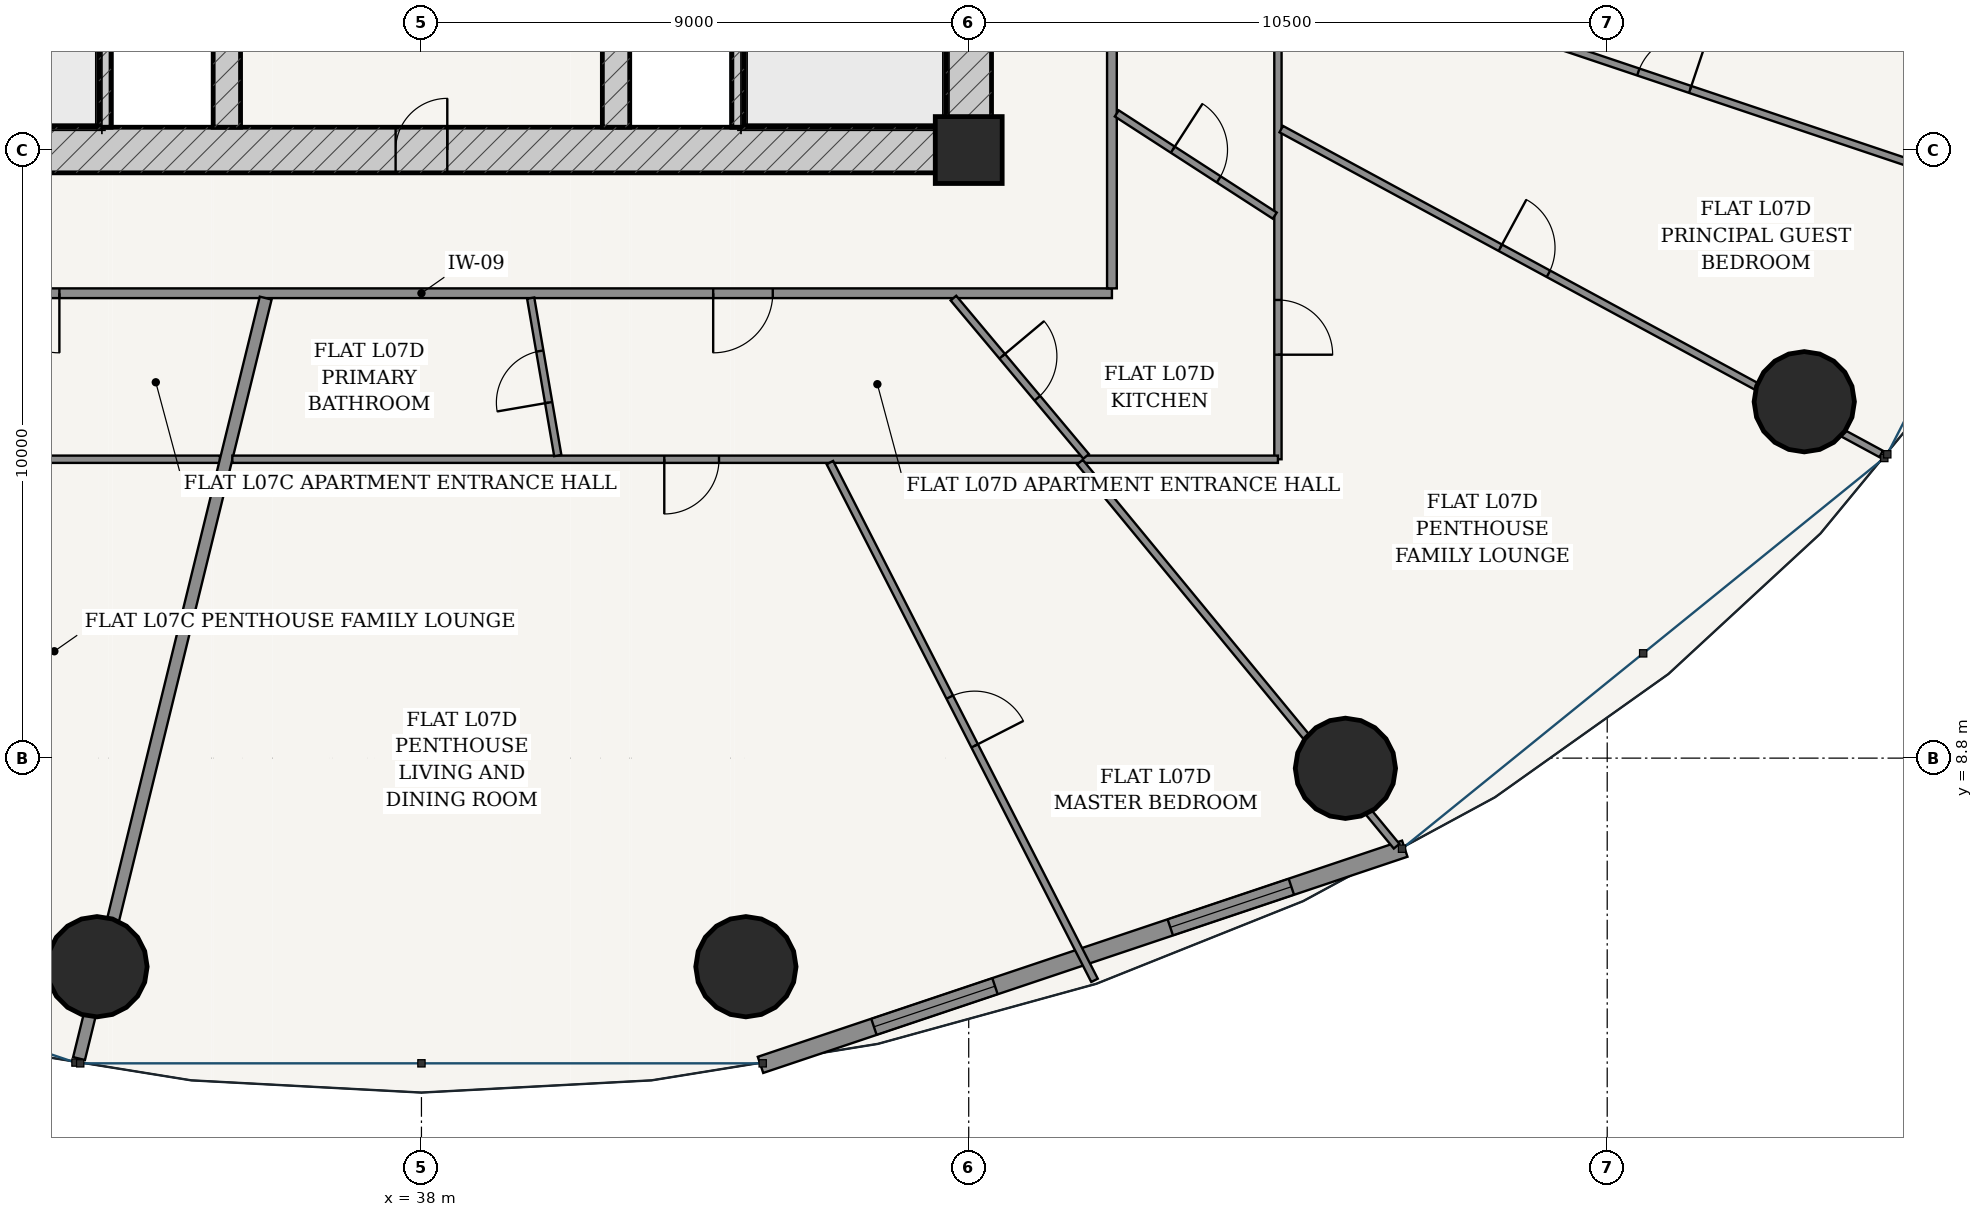
"""IFC4 building model, lengths in metres.
Left out: names, types, materials, properties, quantities, classifications, styles, units other than length and angle.
Written with IfcOpenShell. Run it as: python <this file> out.ifc"""

import sys

from ifc_helpers import new_model, si_unit, direction, frame, frame_2d, origin, origin_2d, place, context, subcontext, project, spatial, rectangle, hollow_circle, extrude, source, transform, mapped, element, fill, save


model = new_model("IFC4")
c1 = context("Model", 3, precision=1e-05, world=origin(), true_north=direction((-0.2419218956, 0.970295726276)))
c2 = subcontext(c1, "Body", "Model", "MODEL_VIEW")
j1 = project(units=[si_unit("LENGTHUNIT", "METRE"), si_unit("PLANEANGLEUNIT", "RADIAN")], contexts=[c1])
p1 = place(None, origin())
s1 = spatial("IfcSite", under=j1, at=p1, CompositionType="ELEMENT")
p2 = place(p1, origin())
s2 = spatial("IfcBuilding", under=s1, at=p2, CompositionType="ELEMENT")
p3 = place(p2, frame((0.0, 0.0, 31.2)))
s3 = spatial("IfcBuildingStorey", under=s2, at=p3, CompositionType="ELEMENT", Elevation=31.2)
p4 = place(p3, frame((47.0, 18.8, 0.0), z_axis=(0.0, 0.0, 1.0), x_axis=(1.0, 0.0, 0.0)))
e1 = element("IfcColumn", 1, at=p4, inside=s3, PredefinedType="COLUMN", context=c2, shape_type="SweptSolid", body=[
    extrude(rectangle(XDim=1.1, YDim=1.1, at=origin_2d()), origin(), (0.0, 0.0, 1.0), 3.6),
])
p5 = place(p3, frame((28.625, 18.8, 0.0), z_axis=(0.0, 0.0, 1.0), x_axis=(1.0, 0.0, 0.0)))
e2 = element("IfcWall", 2, at=p5, inside=s3, PredefinedType="SHEAR", context=c2, shape_type="SweptSolid", body=[
    extrude(rectangle(XDim=18.75, YDim=0.75, at=frame_2d((9.375, 0.0))), origin(), (0.0, 0.0, 1.0), 3.32),
])
p6 = place(p5, frame((8.95, 0.0, 0.0)))
e3 = element("IfcOpeningElement", 3, at=p6, cuts=e2, PredefinedType="OPENING", context=c2, shape_type="SweptSolid", body=[
    extrude(rectangle(XDim=0.85, YDim=2.1, at=frame_2d((0.425, 1.05))), frame((0.0, 0.385, 0.0), z_axis=(0.0, -1.0, 0.0), x_axis=(1.0, 0.0, 0.0)), (0.0, 0.0, 1.0), 0.77),
])
p7 = place(p3, frame((47.0, 19.175, 0.0), z_axis=(0.0, 0.0, 1.0), x_axis=(0.0, 1.0, 0.0)))
e4 = element("IfcWall", 4, at=p7, inside=s3, PredefinedType="SHEAR", context=c2, shape_type="SweptSolid", body=[
    extrude(rectangle(XDim=15.25, YDim=0.75, at=frame_2d((7.625, 0.0))), origin(), (0.0, 0.0, 1.0), 3.32),
])
p8 = place(p7, frame((9.875, 0.0, 0.0)))
e5 = element("IfcOpeningElement", 5, at=p8, cuts=e4, PredefinedType="OPENING", context=c2, shape_type="SweptSolid", body=[
    extrude(rectangle(XDim=1.5, YDim=2.2, at=frame_2d((0.75, 1.1))), frame((0.0, 0.385, 0.0), z_axis=(0.0, -1.0, 0.0), x_axis=(1.0, 0.0, 0.0)), (0.0, 0.0, 1.0), 0.77),
])
for number, where, z_axis, x_axis in (
    (6, (32.795, 19.175, 0.0), (0.0, 0.0, 1.0), (0.0, 1.0, 0.0)),
    (7, (43.205, 19.175, 0.0), (0.0, 0.0, 1.0), (0.0, 1.0, 0.0)),
):
    element("IfcWall", number, at=place(p3, frame(where, z_axis=z_axis, x_axis=x_axis)), inside=s3, PredefinedType="SOLIDWALL", context=c2, shape_type="SweptSolid", body=[
        extrude(rectangle(XDim=7.375, YDim=0.2, at=frame_2d((3.688, 0.0))), origin(), (0.0, 0.0, 1.0), 3.32),
    ])
p9 = place(p3, frame((34.8, 19.175, 0.0), z_axis=(0.0, 0.0, 1.0), x_axis=(0.0, 1.0, 0.0)))
e8 = element("IfcWall", 8, at=p9, inside=s3, PredefinedType="SHEAR", context=c2, shape_type="SweptSolid", body=[
    extrude(rectangle(XDim=15.25, YDim=0.45, at=frame_2d((7.625, 0.0))), origin(), (0.0, 0.0, 1.0), 3.32),
])
p10 = place(p9, frame((7.8, 0.0, 0.0)))
e9 = element("IfcOpeningElement", 9, at=p10, cuts=e8, PredefinedType="OPENING", context=c2, shape_type="SweptSolid", body=[
    extrude(rectangle(XDim=1.05, YDim=2.15, at=frame_2d((0.525, 1.075))), frame((0.0, 0.235, 0.0), z_axis=(0.0, -1.0, 0.0), x_axis=(1.0, 0.0, 0.0)), (0.0, 0.0, 1.0), 0.47),
])
p11 = place(p3, frame((41.2, 19.175, 0.0), z_axis=(0.0, 0.0, 1.0), x_axis=(0.0, 1.0, 0.0)))
e10 = element("IfcWall", 10, at=p11, inside=s3, PredefinedType="SHEAR", context=c2, shape_type="SweptSolid", body=[
    extrude(rectangle(XDim=15.25, YDim=0.45, at=frame_2d((7.625, 0.0))), origin(), (0.0, 0.0, 1.0), 3.32),
])
p12 = place(p11, frame((7.8, 0.0, 0.0)))
e11 = element("IfcOpeningElement", 11, at=p12, cuts=e10, PredefinedType="OPENING", context=c2, shape_type="SweptSolid", body=[
    extrude(rectangle(XDim=1.05, YDim=2.15, at=frame_2d((0.525, 1.075))), frame((0.0, 0.235, 0.0), z_axis=(0.0, -1.0, 0.0), x_axis=(1.0, 0.0, 0.0)), (0.0, 0.0, 1.0), 0.47),
])
for number, where, z_axis, x_axis in (
    (12, (32.664, 5.37, 0.0), (0.0, 0.0, 1.0), (1.0, 0.0, 0.0)),
    (13, (43.336, 5.37, 0.0), (0.0, 0.0, 1.0), (1.0, 0.0, 0.0)),
    (14, (53.195, 8.632, 0.0), (0.0, 0.0, 1.0), (1.0, 0.0, 0.0)),
    (15, (60.741, 14.661, 0.0), (0.0, 0.0, 1.0), (1.0, 0.0, 0.0)),
):
    element("IfcColumn", number, at=place(p3, frame(where, z_axis=z_axis, x_axis=x_axis)), inside=s3, PredefinedType="COLUMN", context=c2, shape_type="SweptSolid", body=[
        extrude(hollow_circle(Radius=0.825, WallThickness=0.05, at=origin_2d()), origin(), (0.0, 0.0, 1.0), 3.6),
    ])
p13 = place(p3, frame((43.576, 3.756, 0.0), z_axis=(0.0, 0.0, 1.0), x_axis=(0.948047847546, 0.31812777113, 0.0)))
e16 = element("IfcWall", 16, at=p13, inside=s3, PredefinedType="SOLIDWALL", context=c2, shape_type="SweptSolid", body=[
    extrude(rectangle(XDim=11.175, YDim=0.28, at=frame_2d((5.588, 0.0))), origin(), (0.0, 0.0, 1.0), 3.32),
])
p14 = place(p13, frame((1.967, 0.0, 0.85)))
e17 = element("IfcOpeningElement", 17, at=p14, cuts=e16, PredefinedType="OPENING", context=c2, shape_type="SweptSolid", body=[
    extrude(rectangle(XDim=2.1, YDim=1.95, at=frame_2d((1.05, 0.975))), frame((0.0, 0.15, 0.0), z_axis=(0.0, -1.0, 0.0), x_axis=(1.0, 0.0, 0.0)), (0.0, 0.0, 1.0), 0.3),
])
p15 = place(p13, frame((7.108, 0.0, 0.85)))
e18 = element("IfcOpeningElement", 18, at=p15, cuts=e16, PredefinedType="OPENING", context=c2, shape_type="SweptSolid", body=[
    extrude(rectangle(XDim=2.1, YDim=1.95, at=frame_2d((1.05, 0.975))), frame((0.0, 0.15, 0.0), z_axis=(0.0, -1.0, 0.0), x_axis=(1.0, 0.0, 0.0)), (0.0, 0.0, 1.0), 0.3),
])
p16 = place(p3, frame((26.645, 16.445, 0.0), z_axis=(0.0, 0.0, 1.0), x_axis=(1.0, 0.0, 0.0)))
e19 = element("IfcWall", 19, at=p16, inside=s3, PredefinedType="PARTITIONING", context=c2, shape_type="SweptSolid", body=[
    extrude(rectangle(XDim=22.71, YDim=0.16, at=frame_2d((11.355, 0.0))), origin(), (0.0, 0.0, 1.0), 2.688),
])
p17 = place(p16, frame((4.421, 0.0, 0.0)))
e20 = element("IfcOpeningElement", 20, at=p17, cuts=e19, PredefinedType="OPENING", context=c2, shape_type="SweptSolid", body=[
    extrude(rectangle(XDim=0.98, YDim=2.2, at=frame_2d((0.49, 1.1))), frame((0.0, 0.09, 0.0), z_axis=(0.0, -1.0, 0.0), x_axis=(1.0, 0.0, 0.0)), (0.0, 0.0, 1.0), 0.18),
])
p18 = place(p16, frame((16.153, 0.0, 0.0)))
e21 = element("IfcOpeningElement", 21, at=p18, cuts=e19, PredefinedType="OPENING", context=c2, shape_type="SweptSolid", body=[
    extrude(rectangle(XDim=0.98, YDim=2.2, at=frame_2d((0.49, 1.1))), frame((0.0, 0.09, 0.0), z_axis=(0.0, -1.0, 0.0), x_axis=(1.0, 0.0, 0.0)), (0.0, 0.0, 1.0), 0.18),
])
p19 = place(p3, frame((49.355, 16.525, 0.0), z_axis=(0.0, 0.0, 1.0), x_axis=(0.0, 1.0, 0.0)))
e22 = element("IfcWall", 22, at=p19, inside=s3, PredefinedType="PARTITIONING", context=c2, shape_type="SweptSolid", body=[
    extrude(rectangle(XDim=20.55, YDim=0.16, at=frame_2d((10.275, 0.0))), origin(), (0.0, 0.0, 1.0), 2.688),
])
p20 = place(p19, frame((15.635, 0.0, 0.0)))
e23 = element("IfcOpeningElement", 23, at=p20, cuts=e22, PredefinedType="OPENING", context=c2, shape_type="SweptSolid", body=[
    extrude(rectangle(XDim=0.98, YDim=2.2, at=frame_2d((0.49, 1.1))), frame((0.0, 0.09, 0.0), z_axis=(0.0, -1.0, 0.0), x_axis=(1.0, 0.0, 0.0)), (0.0, 0.0, 1.0), 0.18),
])
p21 = place(p3, frame((34.686, 13.715, 0.0), z_axis=(0.0, 0.0, 1.0), x_axis=(-1.0, 0.0, 0.0)))
e24 = element("IfcWall", 24, at=p21, inside=s3, PredefinedType="PARTITIONING", context=c2, shape_type="SweptSolid", body=[
    extrude(rectangle(XDim=10.771, YDim=0.12, at=frame_2d((5.385, 0.0))), origin(), (0.0, 0.0, 1.0), 2.688),
])
p22 = place(p21, frame((5.01, 0.0, 0.0)))
e25 = element("IfcOpeningElement", 25, at=p22, cuts=e24, PredefinedType="OPENING", context=c2, shape_type="SweptSolid", body=[
    extrude(rectangle(XDim=0.9, YDim=2.15, at=frame_2d((0.45, 1.075))), frame((0.0, 0.07, 0.0), z_axis=(0.0, -1.0, 0.0), x_axis=(1.0, 0.0, 0.0)), (0.0, 0.0, 1.0), 0.14),
])
p23 = place(p3, frame((35.438, 16.365, 0.0), z_axis=(0.0, 0.0, 1.0), x_axis=(-0.238380116209, -0.971171931326, 0.0)))
e26 = element("IfcWall", 26, at=p23, inside=s3, PredefinedType="PARTITIONING", context=c2, shape_type="SweptSolid", body=[
    extrude(rectangle(XDim=12.877, YDim=0.2, at=frame_2d((6.438, 0.0))), origin(), (0.0, 0.0, 1.0), 2.688),
])
p24 = place(p3, frame((52.085, 24.428, 0.0), z_axis=(0.0, 0.0, 1.0), x_axis=(0.0, -1.0, 0.0)))
e27 = element("IfcWall", 27, at=p24, inside=s3, PredefinedType="PARTITIONING", context=c2, shape_type="SweptSolid", body=[
    extrude(rectangle(XDim=10.713, YDim=0.12, at=frame_2d((5.356, 0.0))), origin(), (0.0, 0.0, 1.0), 2.688),
])
p25 = place(p24, frame((8.094, 0.0, 0.0)))
e28 = element("IfcOpeningElement", 28, at=p25, cuts=e27, PredefinedType="OPENING", context=c2, shape_type="SweptSolid", body=[
    extrude(rectangle(XDim=0.9, YDim=2.15, at=frame_2d((0.45, 1.075))), frame((0.0, 0.07, 0.0), z_axis=(0.0, -1.0, 0.0), x_axis=(1.0, 0.0, 0.0)), (0.0, 0.0, 1.0), 0.14),
])
p26 = place(p3, frame((52.085, 13.715, 0.0), z_axis=(0.0, 0.0, 1.0), x_axis=(-1.0, 0.0, 0.0)))
e29 = element("IfcWall", 29, at=p26, inside=s3, PredefinedType="PARTITIONING", context=c2, shape_type="SweptSolid", body=[
    extrude(rectangle(XDim=17.195, YDim=0.12, at=frame_2d((8.597, 0.0))), origin(), (0.0, 0.0, 1.0), 2.688),
])
p27 = place(p26, frame((9.191, 0.0, 0.0)))
e30 = element("IfcOpeningElement", 30, at=p27, cuts=e29, PredefinedType="OPENING", context=c2, shape_type="SweptSolid", body=[
    extrude(rectangle(XDim=0.9, YDim=2.15, at=frame_2d((0.45, 1.075))), frame((0.0, 0.07, 0.0), z_axis=(0.0, -1.0, 0.0), x_axis=(1.0, 0.0, 0.0)), (0.0, 0.0, 1.0), 0.14),
])
p28 = place(p3, frame((44.717, 13.66, 0.0), z_axis=(0.0, 0.0, 1.0), x_axis=(0.455131303234, -0.890424335256, 0.0)))
e31 = element("IfcWall", 31, at=p28, inside=s3, PredefinedType="PARTITIONING", context=c2, shape_type="SweptSolid", body=[
    extrude(rectangle(XDim=9.562, YDim=0.12, at=frame_2d((4.781, 0.0))), origin(), (0.0, 0.0, 1.0), 2.762),
])
p29 = place(p28, frame((4.331, 0.0, 0.0)))
e32 = element("IfcOpeningElement", 32, at=p29, cuts=e31, PredefinedType="OPENING", context=c2, shape_type="SweptSolid", body=[
    extrude(rectangle(XDim=0.9, YDim=2.15, at=frame_2d((0.45, 1.075))), frame((0.0, 0.07, 0.0), z_axis=(0.0, -1.0, 0.0), x_axis=(1.0, 0.0, 0.0)), (0.0, 0.0, 1.0), 0.14),
])
p30 = place(p3, frame((48.829, 13.667, 0.0), z_axis=(0.0, 0.0, 1.0), x_axis=(0.636177533893, -0.771542704826, 0.0)))
e33 = element("IfcWall", 33, at=p30, inside=s3, PredefinedType="PARTITIONING", context=c2, shape_type="SweptSolid", body=[
    extrude(rectangle(XDim=8.187, YDim=0.12, at=frame_2d((4.093, 0.0))), origin(), (0.0, 0.0, 1.0), 2.688),
])
p31 = place(p3, frame((52.139, 19.144, 0.0), z_axis=(0.0, 0.0, 1.0), x_axis=(0.879372452045, -0.476134529922, 0.0)))
e34 = element("IfcWall", 34, at=p31, inside=s3, PredefinedType="PARTITIONING", context=c2, shape_type="SweptSolid", body=[
    extrude(rectangle(XDim=11.219, YDim=0.12, at=frame_2d((5.61, 0.0))), origin(), (0.0, 0.0, 1.0), 2.688),
])
p32 = place(p31, frame((4.097, 0.0, 0.0)))
e35 = element("IfcOpeningElement", 35, at=p32, cuts=e34, PredefinedType="OPENING", context=c2, shape_type="SweptSolid", body=[
    extrude(rectangle(XDim=0.9, YDim=2.15, at=frame_2d((0.45, 1.075))), frame((0.0, 0.07, 0.0), z_axis=(0.0, -1.0, 0.0), x_axis=(1.0, 0.0, 0.0)), (0.0, 0.0, 1.0), 0.14),
])
p33 = place(p3, frame((52.144, 22.052, 0.0), z_axis=(0.0, 0.0, 1.0), x_axis=(0.948023034133, -0.318201707653, 0.0)))
e36 = element("IfcWall", 36, at=p33, inside=s3, PredefinedType="PARTITIONING", context=c2, shape_type="SweptSolid", body=[
    extrude(rectangle(XDim=13.279, YDim=0.12, at=frame_2d((6.639, 0.0))), origin(), (0.0, 0.0, 1.0), 2.762),
])
p34 = place(p33, frame((6.189, 0.0, 0.0)))
e37 = element("IfcOpeningElement", 37, at=p34, cuts=e36, PredefinedType="OPENING", context=c2, shape_type="SweptSolid", body=[
    extrude(rectangle(XDim=0.9, YDim=2.15, at=frame_2d((0.45, 1.075))), frame((0.0, 0.07, 0.0), z_axis=(0.0, -1.0, 0.0), x_axis=(1.0, 0.0, 0.0)), (0.0, 0.0, 1.0), 0.14),
])
p35 = place(p3, frame((39.796, 16.365, 0.0), z_axis=(0.0, 0.0, 1.0), x_axis=(0.169611246875, -0.985511047596, 0.0)))
e38 = element("IfcWall", 38, at=p35, inside=s3, PredefinedType="PARTITIONING", context=c2, shape_type="SweptSolid", body=[
    extrude(rectangle(XDim=2.627, YDim=0.12, at=frame_2d((1.313, 0.0))), origin(), (0.0, 0.0, 1.0), 3.32),
])
p36 = place(p35, frame((0.884, 0.0, 0.0)))
e39 = element("IfcOpeningElement", 39, at=p36, cuts=e38, PredefinedType="OPENING", context=c2, shape_type="SweptSolid", body=[
    extrude(rectangle(XDim=0.86, YDim=2.15, at=frame_2d((0.43, 1.075))), frame((0.0, 0.07, 0.0), z_axis=(0.0, -1.0, 0.0), x_axis=(1.0, 0.0, 0.0)), (0.0, 0.0, 1.0), 0.14),
])
p37 = place(p3, frame((46.749, 16.365, 0.0), z_axis=(0.0, 0.0, 1.0), x_axis=(0.64245841772, -0.766320547487, 0.0)))
e40 = element("IfcWall", 40, at=p37, inside=s3, PredefinedType="PARTITIONING", context=c2, shape_type="SweptSolid", body=[
    extrude(rectangle(XDim=3.396, YDim=0.12, at=frame_2d((1.698, 0.0))), origin(), (0.0, 0.0, 1.0), 3.32),
])
p38 = place(p37, frame((1.248, 0.0, 0.0)))
e41 = element("IfcOpeningElement", 41, at=p38, cuts=e40, PredefinedType="OPENING", context=c2, shape_type="SweptSolid", body=[
    extrude(rectangle(XDim=0.9, YDim=2.15, at=frame_2d((0.45, 1.075))), frame((0.0, 0.07, 0.0), z_axis=(0.0, -1.0, 0.0), x_axis=(1.0, 0.0, 0.0)), (0.0, 0.0, 1.0), 0.14),
])
p39 = place(p3, frame((49.435, 19.402, 0.0), z_axis=(0.0, 0.0, 1.0), x_axis=(0.839582858019, -0.543231649042, 0.0)))
e42 = element("IfcWall", 42, at=p39, inside=s3, PredefinedType="PARTITIONING", context=c2, shape_type="SweptSolid", body=[
    extrude(rectangle(XDim=3.094, YDim=0.12, at=frame_2d((1.547, 0.0))), origin(), (0.0, 0.0, 1.0), 3.32),
])
p40 = place(p39, frame((1.097, 0.0, 0.0)))
e43 = element("IfcOpeningElement", 43, at=p40, cuts=e42, PredefinedType="OPENING", context=c2, shape_type="SweptSolid", body=[
    extrude(rectangle(XDim=0.9, YDim=2.15, at=frame_2d((0.45, 1.075))), frame((0.0, 0.07, 0.0), z_axis=(0.0, -1.0, 0.0), x_axis=(1.0, 0.0, 0.0)), (0.0, 0.0, 1.0), 0.14),
])
m1 = source(origin(), c2, "Body", "SweptSolid", [
    extrude(rectangle(XDim=2.1, YDim=1.95, at=frame_2d((1.05, 0.975))), frame((0.0, 0.03, 0.0), z_axis=(0.0, -1.0, 0.0), x_axis=(1.0, 0.0, 0.0)), (0.0, 0.0, 1.0), 0.06),
])
p41 = place(p14, origin())
e44 = element("IfcWindow", 44, at=p41, inside=s3, PartitioningType="SINGLE_PANEL", PredefinedType="WINDOW", context=c2, shape_type="MappedRepresentation", body=[
    mapped(m1, transform((0.0, 0.0, 0.0), scale=1.0)),
])
fill(e17, e44)
p42 = place(p15, origin())
e45 = element("IfcWindow", 45, at=p42, inside=s3, PartitioningType="SINGLE_PANEL", PredefinedType="WINDOW", context=c2, shape_type="MappedRepresentation", body=[
    mapped(m1, transform((0.0, 0.0, 0.0), scale=1.0)),
])
fill(e18, e45)
m2 = source(origin(), c2, "Body", "SweptSolid", [
    extrude(rectangle(XDim=0.85, YDim=2.1, at=frame_2d((0.425, 1.05))), frame((0.0, 0.025, 0.0), z_axis=(0.0, -1.0, 0.0), x_axis=(1.0, 0.0, 0.0)), (0.0, 0.0, 1.0), 0.05),
])
p43 = place(p6, origin())
e46 = element("IfcDoor", 46, at=p43, inside=s3, OperationType="SINGLE_SWING_RIGHT", PredefinedType="DOOR", context=c2, shape_type="MappedRepresentation", body=[
    mapped(m2, transform((0.0, 0.0, 0.0), scale=1.0)),
])
fill(e3, e46)
m3 = source(origin(), c2, "Body", "SweptSolid", [
    extrude(rectangle(XDim=0.98, YDim=2.2, at=frame_2d((0.49, 1.1))), frame((0.0, 0.025, 0.0), z_axis=(0.0, -1.0, 0.0), x_axis=(1.0, 0.0, 0.0)), (0.0, 0.0, 1.0), 0.05),
])
p44 = place(p17, frame((0.98, 0.0, 0.0), z_axis=(0.0, 0.0, 1.0), x_axis=(-1.0, 0.0, 0.0)))
e47 = element("IfcDoor", 47, at=p44, inside=s3, OperationType="SINGLE_SWING_LEFT", PredefinedType="DOOR", context=c2, shape_type="MappedRepresentation", body=[
    mapped(m3, transform((0.0, 0.0, 0.0), scale=1.0)),
])
fill(e20, e47)
p45 = place(p18, frame((0.98, 0.0, 0.0), z_axis=(0.0, 0.0, 1.0), x_axis=(-1.0, 0.0, 0.0)))
e48 = element("IfcDoor", 48, at=p45, inside=s3, OperationType="SINGLE_SWING_RIGHT", PredefinedType="DOOR", context=c2, shape_type="MappedRepresentation", body=[
    mapped(m3, transform((0.0, 0.0, 0.0), scale=1.0)),
])
fill(e21, e48)
m4 = source(origin(), c2, "Body", "SweptSolid", [
    extrude(rectangle(XDim=0.86, YDim=2.15, at=frame_2d((0.43, 1.075))), frame((0.0, 0.025, 0.0), z_axis=(0.0, -1.0, 0.0), x_axis=(1.0, 0.0, 0.0)), (0.0, 0.0, 1.0), 0.05),
])
p46 = place(p36, frame((0.86, 0.0, 0.0), z_axis=(0.0, 0.0, 1.0), x_axis=(-1.0, 0.0, 0.0)))
e49 = element("IfcDoor", 49, at=p46, inside=s3, OperationType="SINGLE_SWING_LEFT", PredefinedType="DOOR", context=c2, shape_type="MappedRepresentation", body=[
    mapped(m4, transform((0.0, 0.0, 0.0), scale=1.0)),
])
fill(e39, e49)
m5 = source(origin(), c2, "Body", "SweptSolid", [
    extrude(rectangle(XDim=0.9, YDim=2.15, at=frame_2d((0.45, 1.075))), frame((0.0, 0.025, 0.0), z_axis=(0.0, -1.0, 0.0), x_axis=(1.0, 0.0, 0.0)), (0.0, 0.0, 1.0), 0.05),
])
p47 = place(p27, origin())
e50 = element("IfcDoor", 50, at=p47, inside=s3, OperationType="SINGLE_SWING_RIGHT", PredefinedType="DOOR", context=c2, shape_type="MappedRepresentation", body=[
    mapped(m5, transform((0.0, 0.0, 0.0), scale=1.0)),
])
fill(e30, e50)
p48 = place(p38, origin())
e51 = element("IfcDoor", 51, at=p48, inside=s3, OperationType="SINGLE_SWING_LEFT", PredefinedType="DOOR", context=c2, shape_type="MappedRepresentation", body=[
    mapped(m5, transform((0.0, 0.0, 0.0), scale=1.0)),
])
fill(e41, e51)
p49 = place(p25, origin())
e52 = element("IfcDoor", 52, at=p49, inside=s3, OperationType="SINGLE_SWING_RIGHT", PredefinedType="DOOR", context=c2, shape_type="MappedRepresentation", body=[
    mapped(m5, transform((0.0, 0.0, 0.0), scale=1.0)),
])
fill(e28, e52)
p50 = place(p40, origin())
e53 = element("IfcDoor", 53, at=p50, inside=s3, OperationType="SINGLE_SWING_LEFT", PredefinedType="DOOR", context=c2, shape_type="MappedRepresentation", body=[
    mapped(m5, transform((0.0, 0.0, 0.0), scale=1.0)),
])
fill(e43, e53)
p51 = place(p29, origin())
e54 = element("IfcDoor", 54, at=p51, inside=s3, OperationType="SINGLE_SWING_RIGHT", PredefinedType="DOOR", context=c2, shape_type="MappedRepresentation", body=[
    mapped(m5, transform((0.0, 0.0, 0.0), scale=1.0)),
])
fill(e32, e54)
p52 = place(p32, origin())
e55 = element("IfcDoor", 55, at=p52, inside=s3, OperationType="SINGLE_SWING_LEFT", PredefinedType="DOOR", context=c2, shape_type="MappedRepresentation", body=[
    mapped(m5, transform((0.0, 0.0, 0.0), scale=1.0)),
])
fill(e35, e55)
p53 = place(p34, origin())
e56 = element("IfcDoor", 56, at=p53, inside=s3, OperationType="SINGLE_SWING_RIGHT", PredefinedType="DOOR", context=c2, shape_type="MappedRepresentation", body=[
    mapped(m5, transform((0.0, 0.0, 0.0), scale=1.0)),
])
fill(e37, e56)
save(model, sys.argv[1])
